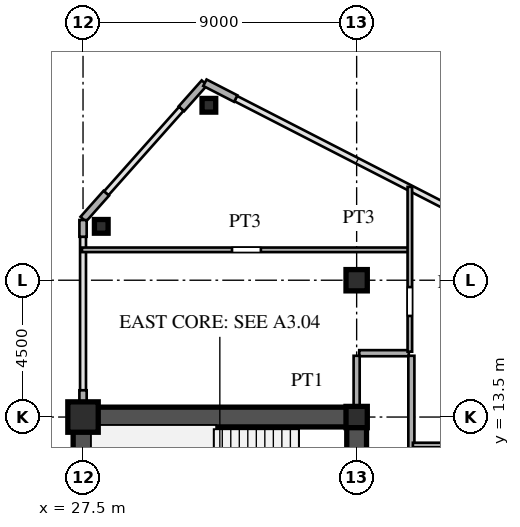
"""IFC4 building model, lengths in metres.
Left out: names, types, materials, properties, quantities, classifications, styles, units other than length and angle.
Written with IfcOpenShell. Run it as: python <this file> out.ifc"""

import sys

from ifc_helpers import new_model, si_unit, direction, frame, frame_2d, origin, origin_2d, place, context, subcontext, project, spatial, rectangle, hollow_rectangle, i_section, extrude, source, transform, mapped, element, save


model = new_model("IFC4")
c1 = context("Model", 3, precision=1e-05, world=origin(), true_north=direction((0.0, 1.0)))
c2 = subcontext(c1, "Body", "Model", "MODEL_VIEW")
j1 = project(units=[si_unit("LENGTHUNIT", "METRE"), si_unit("PLANEANGLEUNIT", "RADIAN")], contexts=[c1])
p1 = place(None, origin())
s1 = spatial("IfcSite", under=j1, at=p1, CompositionType="ELEMENT")
p2 = place(p1, origin())
s2 = spatial("IfcBuilding", under=s1, at=p2, CompositionType="ELEMENT")
p3 = place(p2, frame((0.0, 0.0, 114.0)))
s3 = spatial("IfcBuildingStorey", under=s2, at=p3, CompositionType="ELEMENT", Elevation=114.0)
m1 = source(origin(), c2, "Body", "SweptSolid", [
    extrude(hollow_rectangle(XDim=1.0, YDim=1.0, WallThickness=0.042, at=origin_2d()), origin(), (0.0, 0.0, 1.0), 3.6),
])
p4 = place(p3, frame((27.5, 13.5, 0.0), z_axis=(0.0, 0.0, 1.0), x_axis=(1.0, 0.0, 0.0)))
e1 = element("IfcColumn", 1, at=p4, inside=s3, PredefinedType="COLUMN", context=c2, shape_type="MappedRepresentation", body=[
    mapped(m1, transform((0.0, 0.0, 0.0), scale=1.0)),
])
m2 = source(origin(), c2, "Body", "SweptSolid", [
    extrude(i_section(OverallWidth=0.7, OverallDepth=0.7, WebThickness=0.028, FlangeThickness=0.045, at=origin_2d()), origin(), (0.0, 0.0, 1.0), 3.6),
])
for number, where, z_axis, x_axis in (
    (2, (36.5, 13.5, 0.0), (0.0, 0.0, 1.0), (1.0, 0.0, 0.0)),
    (3, (36.5, 18.0, 0.0), (0.0, 0.0, 1.0), (1.0, 0.0, 0.0)),
):
    element("IfcColumn", number, at=place(p3, frame(where, z_axis=z_axis, x_axis=x_axis)), inside=s3, PredefinedType="COLUMN", context=c2, shape_type="MappedRepresentation", body=[
        mapped(m2, transform((0.0, 0.0, 0.0), scale=1.0)),
    ])
m3 = source(origin(), c2, "Body", "SweptSolid", [
    extrude(hollow_rectangle(XDim=0.45, YDim=0.45, WallThickness=0.018, at=origin_2d()), origin(), (0.0, 0.0, 1.0), 3.6),
])
for number, where, z_axis, x_axis in (
    (4, (31.64, 23.754, 0.0), (0.0, 0.0, 1.0), (1.0, 0.0, 0.0)),
    (5, (28.1, 19.772, 0.0), (0.0, 0.0, 1.0), (1.0, 0.0, 0.0)),
):
    element("IfcColumn", number, at=place(p3, frame(where, z_axis=z_axis, x_axis=x_axis)), inside=s3, PredefinedType="COLUMN", context=c2, shape_type="MappedRepresentation", body=[
        mapped(m3, transform((0.0, 0.0, 0.0), scale=1.0)),
    ])
p5 = place(p3, frame((32.523, 23.975, 0.0), z_axis=(0.0, 0.0, 1.0), x_axis=(-0.889797395748, 0.456355776255, 0.0)))
e6 = element("IfcWall", 6, at=p5, inside=s3, PredefinedType="SOLIDWALL", context=c2, shape_type="SweptSolid", body=[
    extrude(rectangle(XDim=1.14, YDim=0.24, at=frame_2d((0.57, 0.0))), origin(), (0.0, 0.0, 1.0), 3.38),
])
for number, where, z_axis, x_axis in (
    (7, (31.493, 24.492, 0.0), (0.0, 0.0, 1.0), (-0.664, -0.747, 0.0)),
    (8, (28.264, 20.86, 0.0), (0.0, 0.0, 1.0), (-0.664, -0.747, 0.0)),
):
    element("IfcWall", number, at=place(p3, frame(where, z_axis=z_axis, x_axis=x_axis)), inside=s3, PredefinedType="SOLIDWALL", context=c2, shape_type="SweptSolid", body=[
        extrude(rectangle(XDim=1.14, YDim=0.24, at=frame_2d((0.57, 0.0))), origin(), (0.0, 0.0, 1.0), 3.38),
    ])
p6 = place(p3, frame((27.5, 13.83, 0.0), z_axis=(0.0, 0.0, 1.0), x_axis=(0.0, 1.0, 0.0)))
e9 = element("IfcWall", 9, at=p6, inside=s3, PredefinedType="SOLIDWALL", context=c2, shape_type="SweptSolid", body=[
    extrude(rectangle(XDim=0.55, YDim=0.24, at=frame_2d((0.275, 0.0))), origin(), (0.0, 0.0, 1.0), 2.88),
])
p7 = place(p3, frame((27.5, 19.43, 0.0), z_axis=(0.0, 0.0, 1.0), x_axis=(0.0, 1.0, 0.0)))
e10 = element("IfcWall", 10, at=p7, inside=s3, PredefinedType="SOLIDWALL", context=c2, shape_type="SweptSolid", body=[
    extrude(rectangle(XDim=0.55, YDim=0.24, at=frame_2d((0.275, 0.0))), origin(), (0.0, 0.0, 1.0), 3.38),
])
p8 = place(p3, frame((27.5, 1.3, 0.0), z_axis=(0.0, 0.0, 1.0), x_axis=(0.0, 1.0, 0.0)))
e11 = element("IfcWall", 11, at=p8, inside=s3, PredefinedType="SHEAR", context=c2, shape_type="SweptSolid", body=[
    extrude(rectangle(XDim=12.2, YDim=0.65, at=frame_2d((6.1, 0.0))), origin(), (0.0, 0.0, 1.0), 3.38),
])
p9 = place(p3, frame((27.5, 13.5, 0.0), z_axis=(0.0, 0.0, 1.0), x_axis=(1.0, 0.0, 0.0)))
e12 = element("IfcWall", 12, at=p9, inside=s3, PredefinedType="SHEAR", context=c2, shape_type="SweptSolid", body=[
    extrude(rectangle(XDim=9.0, YDim=0.65, at=frame_2d((4.5, 0.0))), origin(), (0.0, 0.0, 1.0), 3.38),
])
p10 = place(p3, frame((36.5, 8.2, 0.0), z_axis=(0.0, 0.0, 1.0), x_axis=(0.0, 1.0, 0.0)))
e13 = element("IfcWall", 13, at=p10, inside=s3, PredefinedType="SHEAR", context=c2, shape_type="SweptSolid", body=[
    extrude(rectangle(XDim=5.45, YDim=0.65, at=frame_2d((2.725, 0.0))), origin(), (0.0, 0.0, 1.0), 3.38),
])
p11 = place(p10, frame((0.245, 0.0, 0.0)))
e14 = element("IfcOpeningElement", 14, at=p11, cuts=e13, PredefinedType="OPENING", context=c2, shape_type="SweptSolid", body=[
    extrude(rectangle(XDim=0.95, YDim=2.15, at=frame_2d((0.475, 1.075))), frame((0.0, 0.335, 0.0), z_axis=(0.0, -1.0, 0.0), x_axis=(1.0, 0.0, 0.0)), (0.0, 0.0, 1.0), 0.67),
])
p12 = place(p3, frame((38.35, 12.58, 0.0), z_axis=(0.0, 0.0, 1.0), x_axis=(1.0, 0.0, 0.0)))
e15 = element("IfcWall", 15, at=p12, inside=s3, PredefinedType="PARTITIONING", context=c2, shape_type="SweptSolid", body=[
    extrude(rectangle(XDim=5.7, YDim=0.15, at=frame_2d((2.85, 0.0))), origin(), (0.0, 0.0, 1.0), 3.38),
])
p13 = place(p12, frame((2.375, 0.0, 0.0)))
e16 = element("IfcOpeningElement", 16, at=p13, cuts=e15, PredefinedType="OPENING", context=c2, shape_type="SweptSolid", body=[
    extrude(rectangle(XDim=0.95, YDim=2.15, at=frame_2d((0.475, 1.075))), frame((0.0, 0.085, 0.0), z_axis=(0.0, -1.0, 0.0), x_axis=(1.0, 0.0, 0.0)), (0.0, 0.0, 1.0), 0.17),
])
p14 = place(p3, frame((36.585, 15.6, 0.0), z_axis=(0.0, 0.0, 1.0), x_axis=(1.0, 0.0, 0.0)))
e17 = element("IfcWall", 17, at=p14, inside=s3, PredefinedType="PARTITIONING", context=c2, shape_type="SweptSolid", body=[
    extrude(rectangle(XDim=1.63, YDim=0.2, at=frame_2d((0.815, 0.0))), origin(), (0.0, 0.0, 1.0), 3.38),
])
p15 = place(p3, frame((27.465, 19.0, 0.0), z_axis=(0.0, 0.0, 1.0), x_axis=(1.0, 0.0, 0.0)))
e18 = element("IfcWall", 18, at=p15, inside=s3, PredefinedType="PARTITIONING", context=c2, shape_type="SweptSolid", body=[
    extrude(rectangle(XDim=10.735, YDim=0.15, at=frame_2d((5.367, 0.0))), origin(), (0.0, 0.0, 1.0), 3.38),
])
p16 = place(p15, frame((4.935, 0.0, 0.0)))
e19 = element("IfcOpeningElement", 19, at=p16, cuts=e18, PredefinedType="OPENING", context=c2, shape_type="SweptSolid", body=[
    extrude(rectangle(XDim=0.95, YDim=2.15, at=frame_2d((0.475, 1.075))), frame((0.0, 0.085, 0.0), z_axis=(0.0, -1.0, 0.0), x_axis=(1.0, 0.0, 0.0)), (0.0, 0.0, 1.0), 0.17),
])
p17 = place(p3, frame((36.5, 13.83, 0.0), z_axis=(0.0, 0.0, 1.0), x_axis=(0.0, 1.0, 0.0)))
e20 = element("IfcWall", 20, at=p17, inside=s3, PredefinedType="PARTITIONING", context=c2, shape_type="SweptSolid", body=[
    extrude(rectangle(XDim=1.685, YDim=0.2, at=frame_2d((0.842, 0.0))), origin(), (0.0, 0.0, 1.0), 2.78),
])
p18 = place(p3, frame((38.25, 15.65, 0.0), z_axis=(0.0, 0.0, 1.0), x_axis=(0.0, 1.0, 0.0)))
e21 = element("IfcWall", 21, at=p18, inside=s3, PredefinedType="PARTITIONING", context=c2, shape_type="SweptSolid", body=[
    extrude(rectangle(XDim=5.421, YDim=0.15, at=frame_2d((2.71, 0.0))), origin(), (0.0, 0.0, 1.0), 3.38),
])
p19 = place(p18, frame((1.175, 0.0, 0.0)))
e22 = element("IfcOpeningElement", 22, at=p19, cuts=e21, PredefinedType="OPENING", context=c2, shape_type="SweptSolid", body=[
    extrude(rectangle(XDim=0.95, YDim=2.15, at=frame_2d((0.475, 1.075))), frame((0.0, 0.085, 0.0), z_axis=(0.0, -1.0, 0.0), x_axis=(1.0, 0.0, 0.0)), (0.0, 0.0, 1.0), 0.17),
])
p20 = place(p3, frame((38.3, -15.515, 0.0), z_axis=(0.0, 0.0, 1.0), x_axis=(0.0, 1.0, 0.0)))
e23 = element("IfcWall", 23, at=p20, inside=s3, PredefinedType="PARTITIONING", context=c2, shape_type="SweptSolid", body=[
    extrude(rectangle(XDim=31.03, YDim=0.2, at=frame_2d((15.515, 0.0))), origin(), (0.0, 0.0, 1.0), 3.38),
])
p21 = place(p20, frame((3.345, 0.0, 0.0)))
e24 = element("IfcOpeningElement", 24, at=p21, cuts=e23, PredefinedType="OPENING", context=c2, shape_type="SweptSolid", body=[
    extrude(rectangle(XDim=1.05, YDim=2.25, at=frame_2d((0.525, 1.125))), frame((0.0, 0.11, 0.0), z_axis=(0.0, -1.0, 0.0), x_axis=(1.0, 0.0, 0.0)), (0.0, 0.0, 1.0), 0.22),
])
p22 = place(p20, frame((14.28, 0.0, 0.0)))
e25 = element("IfcOpeningElement", 25, at=p22, cuts=e23, PredefinedType="OPENING", context=c2, shape_type="SweptSolid", body=[
    extrude(rectangle(XDim=1.05, YDim=2.25, at=frame_2d((0.525, 1.125))), frame((0.0, 0.11, 0.0), z_axis=(0.0, -1.0, 0.0), x_axis=(1.0, 0.0, 0.0)), (0.0, 0.0, 1.0), 0.22),
])
p23 = place(p20, frame((26.067, 0.0, 0.0)))
e26 = element("IfcOpeningElement", 26, at=p23, cuts=e23, PredefinedType="OPENING", context=c2, shape_type="SweptSolid", body=[
    extrude(rectangle(XDim=1.05, YDim=2.25, at=frame_2d((0.525, 1.125))), frame((0.0, 0.11, 0.0), z_axis=(0.0, -1.0, 0.0), x_axis=(1.0, 0.0, 0.0)), (0.0, 0.0, 1.0), 0.22),
])
save(model, sys.argv[1])
